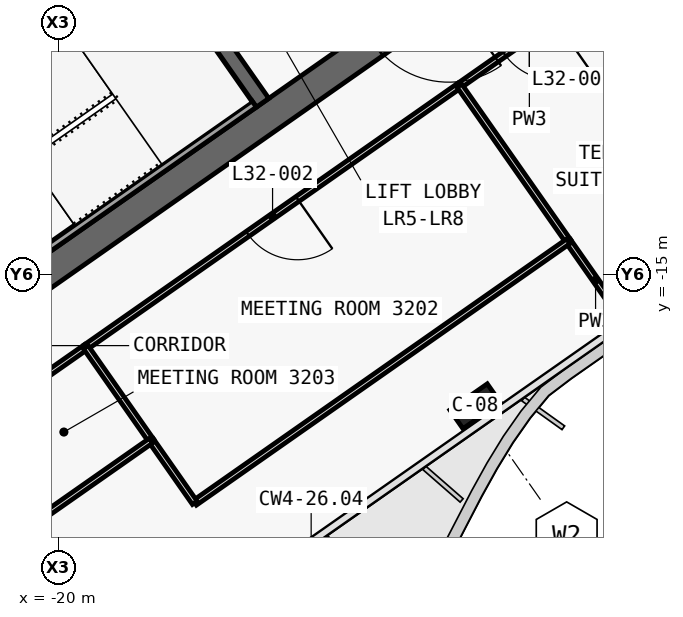
"""IFC4 building model, lengths in metres.
Left out: names, types, materials, properties, quantities, classifications, styles, units other than length and angle.
Written with IfcOpenShell. Run it as: python <this file> out.ifc"""

import sys

from ifc_helpers import new_model, si_unit, direction, frame, frame_2d, origin, origin_2d, place, context, subcontext, project, spatial, polyline, rectangle, outline, extrude, element, fill, save


model = new_model("IFC4")
c1 = context("Model", 3, precision=1e-05, world=origin(), true_north=direction((0.0, 1.0)))
c2 = subcontext(c1, "Body", "Model", "MODEL_VIEW")
j1 = project(units=[si_unit("LENGTHUNIT", "METRE"), si_unit("PLANEANGLEUNIT", "RADIAN")], contexts=[c1])
p1 = place(None, origin())
s1 = spatial("IfcSite", under=j1, at=p1, CompositionType="ELEMENT")
p2 = place(p1, origin())
s2 = spatial("IfcBuilding", under=s1, at=p2, CompositionType="ELEMENT")
p3 = place(p2, frame((0.0, 0.0, 143.7)))
s3 = spatial("IfcBuildingStorey", under=s2, at=p3, CompositionType="ELEMENT", Elevation=143.7)
p4 = place(p3, frame((0.029, -0.712, 0.0), z_axis=(0.0, 0.0, 1.0), x_axis=(-0.819151758019, -0.573576845187, 0.0)))
e1 = element("IfcWall", 1, at=p4, inside=s3, PredefinedType="SHEAR", context=c2, shape_type="SweptSolid", body=[
    extrude(outline(polyline([(26.616, 0.4), (0.56, 0.4), (-0.0, -0.4), (26.616, -0.4), (26.616, 0.4)])), origin(), (0.0, 0.0, 1.0), 3.9),
])
p5 = place(p4, frame((2.966, 0.0, 0.0)))
e2 = element("IfcOpeningElement", 2, at=p5, cuts=e1, PredefinedType="OPENING", context=c2, shape_type="SweptSolid", body=[
    extrude(rectangle(XDim=2.4, YDim=2.1, at=frame_2d((1.2, 1.05))), frame((0.0, 0.41, 0.0), z_axis=(0.0, -1.0, 0.0), x_axis=(1.0, 0.0, 0.0)), (0.0, 0.0, 1.0), 0.82),
])
p6 = place(p4, frame((11.916, 0.0, 0.0)))
e3 = element("IfcOpeningElement", 3, at=p6, cuts=e1, PredefinedType="OPENING", context=c2, shape_type="SweptSolid", body=[
    extrude(rectangle(XDim=2.4, YDim=2.1, at=frame_2d((1.2, 1.05))), frame((0.0, 0.41, 0.0), z_axis=(0.0, -1.0, 0.0), x_axis=(1.0, 0.0, 0.0)), (0.0, 0.0, 1.0), 0.82),
])
p7 = place(p3, frame((-14.63, -10.488, 0.0), z_axis=(0.0, 0.0, 1.0), x_axis=(-0.573611936273, 0.819127185829, 0.0)))
e4 = element("IfcWall", 4, at=p7, inside=s3, PredefinedType="SHEAR", context=c2, shape_type="SweptSolid", body=[
    extrude(outline(polyline([(4.6, 0.2), (0.0, 0.2), (0.0, -0.2), (4.6, -0.2), (4.6, 0.2)])), origin(), (0.0, 0.0, 1.0), 3.9),
])
p8 = place(p3, frame((-2.638, 3.768, 0.0), z_axis=(0.0, 0.0, 1.0), x_axis=(-0.81915267502, -0.573575535572, 0.0)))
e5 = element("IfcWall", 5, at=p8, inside=s3, PredefinedType="SHEAR", context=c2, shape_type="SweptSolid", body=[
    extrude(outline(polyline([(26.2, 0.2), (0.0, 0.2), (0.0, -0.2), (26.2, -0.2), (26.2, 0.2)])), origin(), (0.0, 0.0, 1.0), 3.9),
])
p9 = place(p8, frame((1.169, 0.0, 0.0)))
e6 = element("IfcOpeningElement", 6, at=p9, cuts=e5, PredefinedType="OPENING", context=c2, shape_type="SweptSolid", body=[
    extrude(rectangle(XDim=1.1, YDim=2.1, at=frame_2d((0.55, 1.05))), frame((0.0, 0.21, 0.0), z_axis=(0.0, -1.0, 0.0), x_axis=(1.0, 0.0, 0.0)), (0.0, 0.0, 1.0), 0.42),
])
p10 = place(p8, frame((3.206, 0.0, 0.0)))
e7 = element("IfcOpeningElement", 7, at=p10, cuts=e5, PredefinedType="OPENING", context=c2, shape_type="SweptSolid", body=[
    extrude(rectangle(XDim=1.1, YDim=2.1, at=frame_2d((0.55, 1.05))), frame((0.0, 0.21, 0.0), z_axis=(0.0, -1.0, 0.0), x_axis=(1.0, 0.0, 0.0)), (0.0, 0.0, 1.0), 0.42),
])
p11 = place(p8, frame((5.244, 0.0, 0.0)))
e8 = element("IfcOpeningElement", 8, at=p11, cuts=e5, PredefinedType="OPENING", context=c2, shape_type="SweptSolid", body=[
    extrude(rectangle(XDim=1.1, YDim=2.1, at=frame_2d((0.55, 1.05))), frame((0.0, 0.21, 0.0), z_axis=(0.0, -1.0, 0.0), x_axis=(1.0, 0.0, 0.0)), (0.0, 0.0, 1.0), 0.42),
])
p12 = place(p8, frame((7.281, 0.0, 0.0)))
e9 = element("IfcOpeningElement", 9, at=p12, cuts=e5, PredefinedType="OPENING", context=c2, shape_type="SweptSolid", body=[
    extrude(rectangle(XDim=1.1, YDim=2.1, at=frame_2d((0.55, 1.05))), frame((0.0, 0.21, 0.0), z_axis=(0.0, -1.0, 0.0), x_axis=(1.0, 0.0, 0.0)), (0.0, 0.0, 1.0), 0.42),
])
p13 = place(p8, frame((9.688, 0.0, 0.0)))
e10 = element("IfcOpeningElement", 10, at=p13, cuts=e5, PredefinedType="OPENING", context=c2, shape_type="SweptSolid", body=[
    extrude(rectangle(XDim=1.1, YDim=2.1, at=frame_2d((0.55, 1.05))), frame((0.0, 0.21, 0.0), z_axis=(0.0, -1.0, 0.0), x_axis=(1.0, 0.0, 0.0)), (0.0, 0.0, 1.0), 0.42),
])
p14 = place(p8, frame((11.863, 0.0, 0.0)))
e11 = element("IfcOpeningElement", 11, at=p14, cuts=e5, PredefinedType="OPENING", context=c2, shape_type="SweptSolid", body=[
    extrude(rectangle(XDim=1.1, YDim=2.1, at=frame_2d((0.55, 1.05))), frame((0.0, 0.21, 0.0), z_axis=(0.0, -1.0, 0.0), x_axis=(1.0, 0.0, 0.0)), (0.0, 0.0, 1.0), 0.42),
])
p15 = place(p8, frame((14.038, 0.0, 0.0)))
e12 = element("IfcOpeningElement", 12, at=p15, cuts=e5, PredefinedType="OPENING", context=c2, shape_type="SweptSolid", body=[
    extrude(rectangle(XDim=1.1, YDim=2.1, at=frame_2d((0.55, 1.05))), frame((0.0, 0.21, 0.0), z_axis=(0.0, -1.0, 0.0), x_axis=(1.0, 0.0, 0.0)), (0.0, 0.0, 1.0), 0.42),
])
p16 = place(p8, frame((16.212, 0.0, 0.0)))
e13 = element("IfcOpeningElement", 13, at=p16, cuts=e5, PredefinedType="OPENING", context=c2, shape_type="SweptSolid", body=[
    extrude(rectangle(XDim=1.1, YDim=2.1, at=frame_2d((0.55, 1.05))), frame((0.0, 0.21, 0.0), z_axis=(0.0, -1.0, 0.0), x_axis=(1.0, 0.0, 0.0)), (0.0, 0.0, 1.0), 0.42),
])
p17 = place(p3, frame((-9.038, -18.475, 0.0), z_axis=(0.0, 0.0, 1.0), x_axis=(-0.819152044289, -0.573576436351, 0.0)))
e14 = element("IfcColumn", 14, at=p17, inside=s3, PredefinedType="COLUMN", context=c2, shape_type="SweptSolid", body=[
    extrude(rectangle(XDim=1.2, YDim=0.6, at=origin_2d()), origin(), (0.0, 0.0, 1.0), 3.9),
])
p18 = place(p3, frame((-14.851, -10.521, 0.0), z_axis=(0.0, 0.0, 1.0), x_axis=(-0.819141584393, -0.57359137434, 0.0)))
e15 = element("IfcWall", 15, at=p18, inside=s3, PredefinedType="SOLIDWALL", context=c2, shape_type="SweptSolid", body=[
    extrude(rectangle(XDim=8.0, YDim=0.2, at=frame_2d((4.0, 0.0))), origin(), (0.0, 0.0, 1.0), 3.62),
])
p19 = place(p3, frame((-5.766, -7.456, 0.0), z_axis=(0.0, 0.0, 1.0), x_axis=(-0.819142740634, -0.573589723117, 0.0)))
e16 = element("IfcWall", 16, at=p19, inside=s3, PredefinedType="PARTITIONING", context=c2, shape_type="SweptSolid", body=[
    extrude(rectangle(XDim=4.502, YDim=0.15, at=frame_2d((2.251, 0.0))), origin(), (0.0, 0.0, 1.0), 3.0),
])
p20 = place(p19, frame((1.451, 0.0, 0.0)))
e17 = element("IfcOpeningElement", 17, at=p20, cuts=e16, PredefinedType="OPENING", context=c2, shape_type="SweptSolid", body=[
    extrude(rectangle(XDim=1.6, YDim=2.1, at=frame_2d((0.8, 1.05))), frame((0.0, 0.085, 0.0), z_axis=(0.0, -1.0, 0.0), x_axis=(1.0, 0.0, 0.0)), (0.0, 0.0, 1.0), 0.17),
])
p21 = place(p3, frame((-9.451, -10.036, 0.0), z_axis=(0.0, 0.0, 1.0), x_axis=(-0.81915738424, -0.573568810035, 0.0)))
e18 = element("IfcWall", 18, at=p21, inside=s3, PredefinedType="PARTITIONING", context=c2, shape_type="SweptSolid", body=[
    extrude(rectangle(XDim=12.004, YDim=0.15, at=frame_2d((6.002, 0.0))), origin(), (0.0, 0.0, 1.0), 3.0),
])
p22 = place(p21, frame((5.202, 0.0, 0.0)))
e19 = element("IfcOpeningElement", 19, at=p22, cuts=e18, PredefinedType="OPENING", context=c2, shape_type="SweptSolid", body=[
    extrude(rectangle(XDim=1.6, YDim=2.1, at=frame_2d((0.8, 1.05))), frame((0.0, 0.085, 0.0), z_axis=(0.0, -1.0, 0.0), x_axis=(1.0, 0.0, 0.0)), (0.0, 0.0, 1.0), 0.17),
])
p23 = place(p3, frame((-19.281, -16.919, 0.0), z_axis=(0.0, 0.0, 1.0), x_axis=(-0.819145647741, -0.57358557146, 0.0)))
e20 = element("IfcWall", 20, at=p23, inside=s3, PredefinedType="PARTITIONING", context=c2, shape_type="SweptSolid", body=[
    extrude(rectangle(XDim=10.504, YDim=0.15, at=frame_2d((5.252, 0.0))), origin(), (0.0, 0.0, 1.0), 3.0),
])
p24 = place(p23, frame((4.452, 0.0, 0.0)))
e21 = element("IfcOpeningElement", 21, at=p24, cuts=e20, PredefinedType="OPENING", context=c2, shape_type="SweptSolid", body=[
    extrude(rectangle(XDim=1.6, YDim=2.1, at=frame_2d((0.8, 1.05))), frame((0.0, 0.085, 0.0), z_axis=(0.0, -1.0, 0.0), x_axis=(1.0, 0.0, 0.0)), (0.0, 0.0, 1.0), 0.17),
])
p25 = place(p3, frame((-1.849, -13.051, 0.0), z_axis=(0.0, 0.0, 1.0), x_axis=(-0.57357985571, 0.819149650018, 0.0)))
e22 = element("IfcWall", 22, at=p25, inside=s3, PredefinedType="PARTITIONING", context=c2, shape_type="SweptSolid", body=[
    extrude(rectangle(XDim=6.832, YDim=0.15, at=frame_2d((3.416, 0.0))), origin(), (0.0, 0.0, 1.0), 3.0),
])
p26 = place(p3, frame((-6.583, -14.134, 0.0), z_axis=(0.0, 0.0, 1.0), x_axis=(-0.573557338351, 0.819165416521, 0.0)))
e23 = element("IfcWall", 23, at=p26, inside=s3, PredefinedType="PARTITIONING", context=c2, shape_type="SweptSolid", body=[
    extrude(rectangle(XDim=5.002, YDim=0.15, at=frame_2d((2.501, 0.0))), origin(), (0.0, 0.0, 1.0), 3.62),
])
p27 = place(p3, frame((-5.151, -16.18, 0.0), z_axis=(0.0, 0.0, 1.0), x_axis=(-0.573613022702, 0.819126425033, 0.0)))
e24 = element("IfcWall", 24, at=p27, inside=s3, PredefinedType="PARTITIONING", context=c2, shape_type="SweptSolid", body=[
    extrude(rectangle(XDim=2.501, YDim=0.15, at=frame_2d((1.25, 0.0))), origin(), (0.0, 0.0, 1.0), 2.9),
])
p28 = place(p3, frame((-17.561, -19.379, 0.0), z_axis=(0.0, 0.0, 1.0), x_axis=(-0.573604249862, 0.819132568355, 0.0)))
e25 = element("IfcWall", 25, at=p28, inside=s3, PredefinedType="PARTITIONING", context=c2, shape_type="SweptSolid", body=[
    extrude(rectangle(XDim=3.002, YDim=0.15, at=frame_2d((1.501, 0.0))), origin(), (0.0, 0.0, 1.0), 3.62),
])
p29 = place(p3, frame((-6.585, -14.133, 0.0), z_axis=(0.0, 0.0, 1.0), x_axis=(-0.819156404271, -0.573570209602, 0.0)))
e26 = element("IfcWall", 26, at=p29, inside=s3, PredefinedType="PARTITIONING", context=c2, shape_type="SweptSolid", body=[
    extrude(rectangle(XDim=12.0, YDim=0.15, at=frame_2d((6.0, 0.0))), origin(), (0.0, 0.0, 1.0), 3.0),
])
p30 = place(p3, frame((-16.415, -21.016, 0.0), z_axis=(0.0, 0.0, 1.0), x_axis=(-0.573560601885, 0.819163131473, 0.0)))
e27 = element("IfcWall", 27, at=p30, inside=s3, PredefinedType="PARTITIONING", context=c2, shape_type="SweptSolid", body=[
    extrude(rectangle(XDim=2.001, YDim=0.15, at=frame_2d((1.0, 0.0))), origin(), (0.0, 0.0, 1.0), 3.62),
])
p31 = place(p3, frame((-17.562, -19.377, 0.0), z_axis=(0.0, 0.0, 1.0), x_axis=(-0.81914452344, -0.573587177086, 0.0)))
e28 = element("IfcWall", 28, at=p31, inside=s3, PredefinedType="PARTITIONING", context=c2, shape_type="SweptSolid", body=[
    extrude(rectangle(XDim=10.5, YDim=0.15, at=frame_2d((5.25, 0.0))), origin(), (0.0, 0.0, 1.0), 3.0),
])
p32 = place(p20, origin())
e29 = element("IfcDoor", 29, at=p32, inside=s3, OperationType="DOUBLE_DOOR_SINGLE_SWING", PredefinedType="DOOR", context=c2, shape_type="SweptSolid", body=[
    extrude(rectangle(XDim=1.6, YDim=2.1, at=frame_2d((0.8, 1.05))), frame((0.0, 0.025, 0.0), z_axis=(0.0, -1.0, 0.0), x_axis=(1.0, 0.0, 0.0)), (0.0, 0.0, 1.0), 0.05),
])
fill(e17, e29)
p33 = place(p22, origin())
e30 = element("IfcDoor", 30, at=p33, inside=s3, OperationType="DOUBLE_DOOR_SINGLE_SWING", PredefinedType="DOOR", context=c2, shape_type="SweptSolid", body=[
    extrude(rectangle(XDim=1.6, YDim=2.1, at=frame_2d((0.8, 1.05))), frame((0.0, 0.025, 0.0), z_axis=(0.0, -1.0, 0.0), x_axis=(1.0, 0.0, 0.0)), (0.0, 0.0, 1.0), 0.05),
])
fill(e19, e30)
save(model, sys.argv[1])
